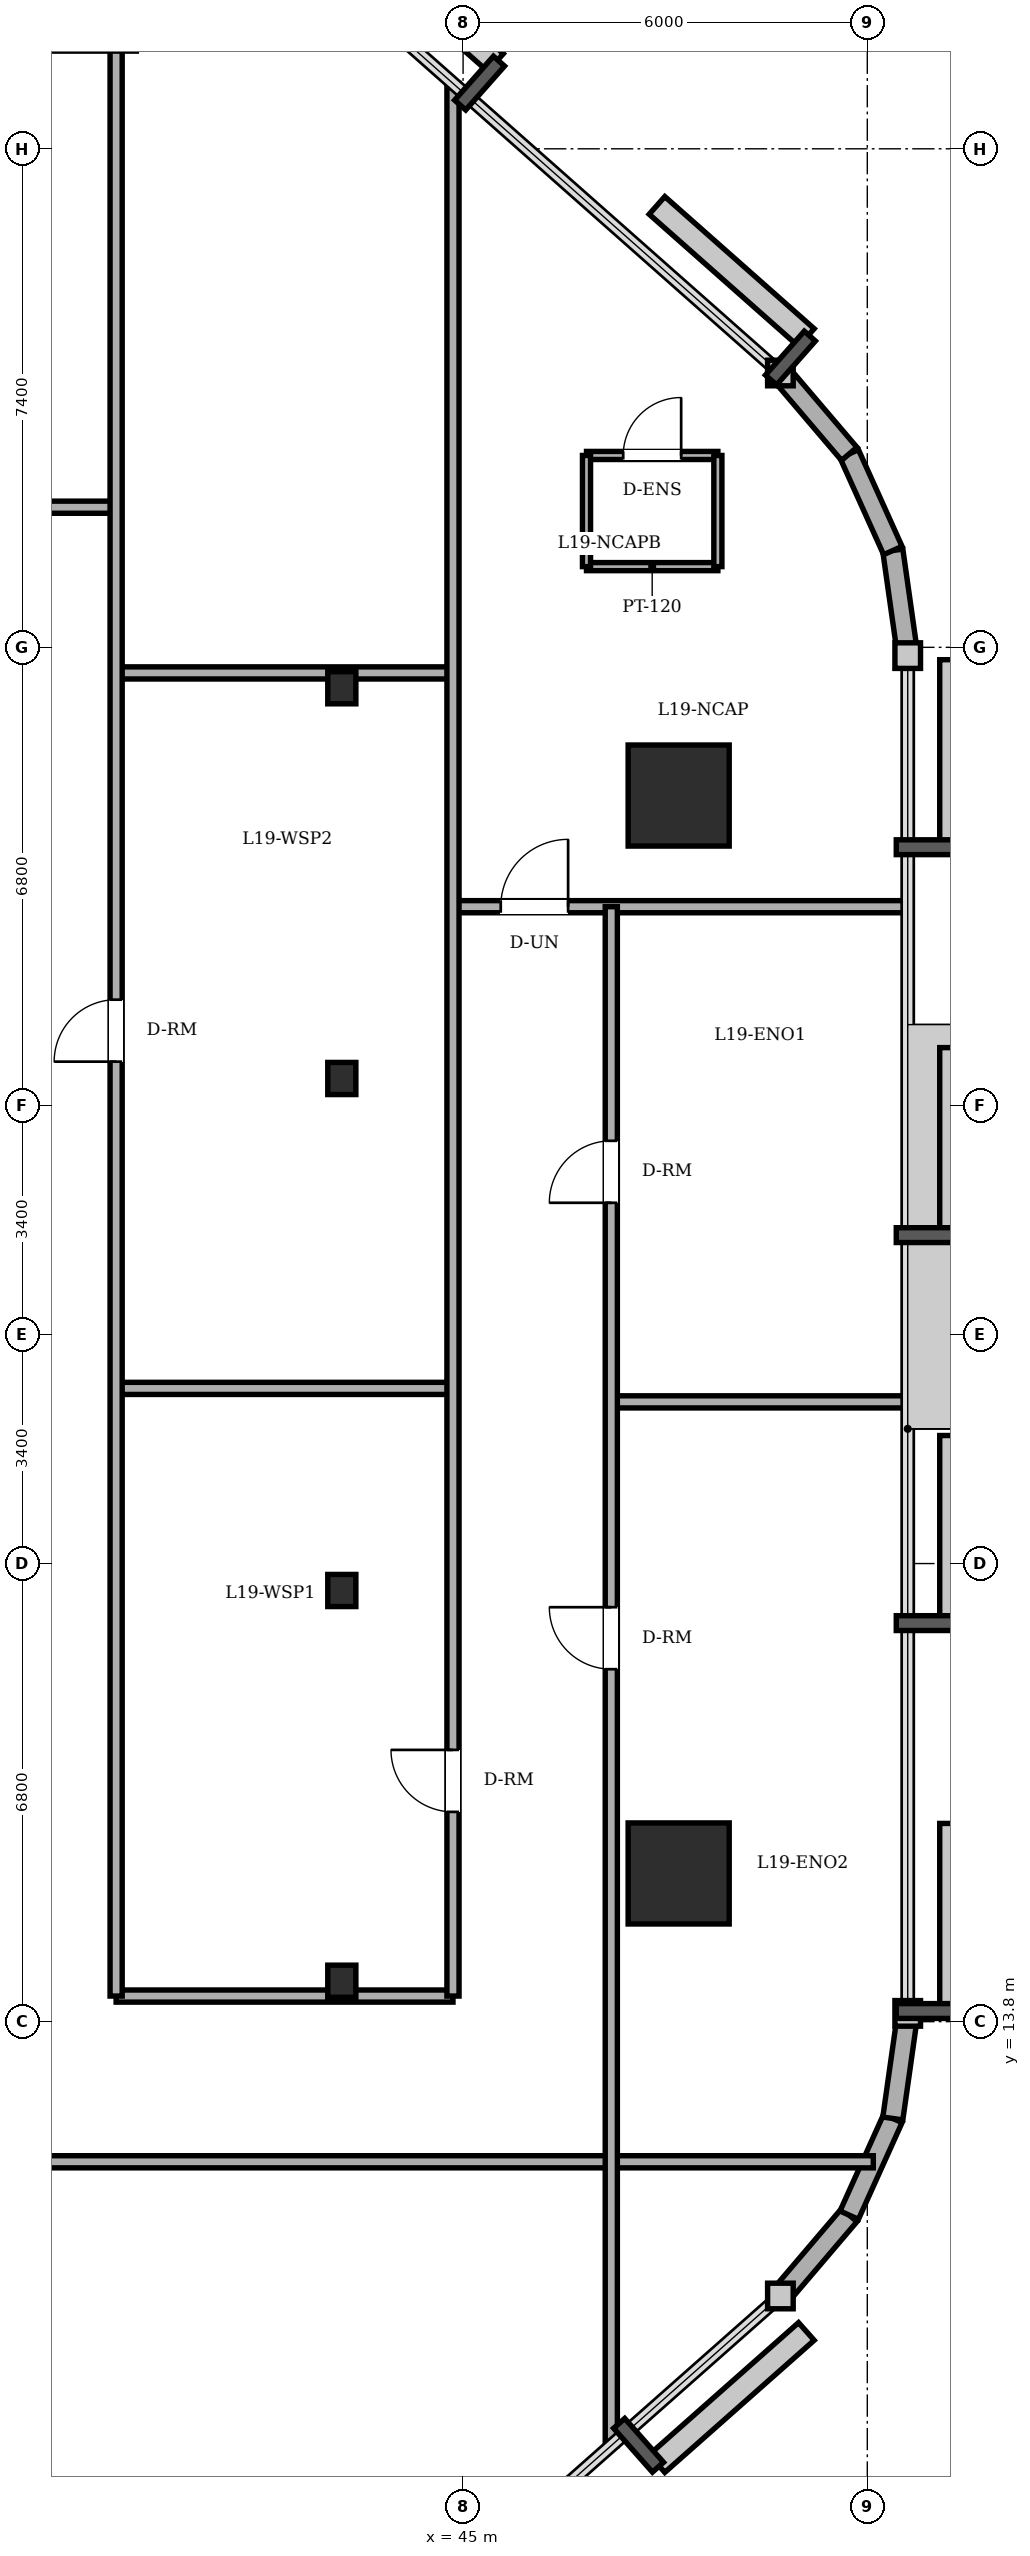
"""IFC4 building model, lengths in metres.
Left out: names, types, materials, properties, quantities, classifications, styles, units other than length and angle.
Written with IfcOpenShell. Run it as: python <this file> out.ifc"""

import sys

from ifc_helpers import new_model, si_unit, direction, frame, frame_2d, origin, origin_2d, place, context, subcontext, project, spatial, rectangle, circle, i_section, extrude, element, fill, save


model = new_model("IFC4")
c1 = context("Model", 3, precision=1e-05, world=origin(), true_north=direction((0.0, 1.0)))
c2 = subcontext(c1, "Body", "Model", "MODEL_VIEW")
j1 = project(units=[si_unit("LENGTHUNIT", "METRE"), si_unit("PLANEANGLEUNIT", "RADIAN")], contexts=[c1])
p1 = place(None, origin())
s1 = spatial("IfcSite", under=j1, at=p1, CompositionType="ELEMENT")
p2 = place(p1, origin())
s2 = spatial("IfcBuilding", under=s1, at=p2, CompositionType="ELEMENT")
p3 = place(p2, frame((0.0, 0.0, 72.0)))
s3 = spatial("IfcBuildingStorey", under=s2, at=p3, CompositionType="ELEMENT", Elevation=72.0)
for number, where, z_axis, x_axis in (
    (1, (48.2, 16.0, 0.0), (0.0, 0.0, 1.0), (1.0, 0.0, 0.0)),
    (2, (48.2, 32.0, 0.0), (0.0, 0.0, 1.0), (1.0, 0.0, 0.0)),
):
    element("IfcColumn", number, at=place(p3, frame(where, z_axis=z_axis, x_axis=x_axis)), inside=s3, PredefinedType="COLUMN", context=c2, shape_type="SweptSolid", body=[
        extrude(circle(Radius=0.75, at=origin_2d()), origin(), (0.0, 0.0, 1.0), 3.6),
    ])
for number, where, z_axis, x_axis in (
    (3, (43.2, 14.4, 0.0), (0.0, 0.0, 1.0), (1.0, 0.0, 0.0)),
    (4, (43.2, 20.2, 0.0), (0.0, 0.0, 1.0), (1.0, 0.0, 0.0)),
    (5, (43.2, 27.8, 0.0), (0.0, 0.0, 1.0), (1.0, 0.0, 0.0)),
    (6, (43.2, 33.6, 0.0), (0.0, 0.0, 1.0), (1.0, 0.0, 0.0)),
):
    element("IfcColumn", number, at=place(p3, frame(where, z_axis=z_axis, x_axis=x_axis)), inside=s3, PredefinedType="COLUMN", context=c2, shape_type="SweptSolid", body=[
        extrude(i_section(OverallWidth=0.417, OverallDepth=0.477, WebThickness=0.036, FlangeThickness=0.057, FilletRadius=0.015, at=origin_2d()), origin(), (0.0, 0.0, 1.0), 3.6),
    ])
p4 = place(p3, frame((49.71, 9.728, 0.0), z_axis=(0.0, 0.0, 1.0), x_axis=(0.648389989909, 0.7613083613, 0.0)))
e7 = element("IfcWall", 7, at=p4, inside=s3, PredefinedType="SOLIDWALL", context=c2, shape_type="SweptSolid", body=[
    extrude(rectangle(XDim=1.576, YDim=0.3, at=frame_2d((0.788, 0.0))), origin(), (0.0, 0.0, 1.0), 3.36),
])
p5 = place(p3, frame((50.732, 10.928, 0.0), z_axis=(0.0, 0.0, 1.0), x_axis=(0.410996558744, 0.911636895206, 0.0)))
e8 = element("IfcWall", 8, at=p5, inside=s3, PredefinedType="SOLIDWALL", context=c2, shape_type="SweptSolid", body=[
    extrude(rectangle(XDim=1.574, YDim=0.3, at=frame_2d((0.787, 0.0))), origin(), (0.0, 0.0, 1.0), 3.36),
])
for number, where, z_axis, x_axis in (
    (9, (51.379, 12.363, 0.0), (0.0, 0.0, 1.0), (0.14, 0.99, 0.0)),
    (10, (51.6, 34.077, 0.0), (0.0, 0.0, 1.0), (-0.14, 0.99, 0.0)),
):
    element("IfcWall", number, at=place(p3, frame(where, z_axis=z_axis, x_axis=x_axis)), inside=s3, PredefinedType="SOLIDWALL", context=c2, shape_type="SweptSolid", body=[
        extrude(rectangle(XDim=1.576, YDim=0.3, at=frame_2d((0.788, 0.0))), origin(), (0.0, 0.0, 1.0), 3.36),
    ])
p6 = place(p3, frame((51.379, 35.637, 0.0), z_axis=(0.0, 0.0, 1.0), x_axis=(-0.410996558744, 0.911636895206, 0.0)))
e11 = element("IfcWall", 11, at=p6, inside=s3, PredefinedType="SOLIDWALL", context=c2, shape_type="SweptSolid", body=[
    extrude(rectangle(XDim=1.574, YDim=0.3, at=frame_2d((0.787, 0.0))), origin(), (0.0, 0.0, 1.0), 3.36),
])
p7 = place(p3, frame((50.732, 37.072, 0.0), z_axis=(0.0, 0.0, 1.0), x_axis=(-0.648389989909, 0.7613083613, 0.0)))
e12 = element("IfcWall", 12, at=p7, inside=s3, PredefinedType="SOLIDWALL", context=c2, shape_type="SweptSolid", body=[
    extrude(rectangle(XDim=1.576, YDim=0.3, at=frame_2d((0.788, 0.0))), origin(), (0.0, 0.0, 1.0), 3.36),
])
p8 = place(p3, frame((46.832, 37.048, 0.0), z_axis=(0.0, 0.0, 1.0), x_axis=(1.0, 0.0, 0.0)))
e13 = element("IfcWall", 13, at=p8, inside=s3, PredefinedType="PARTITIONING", context=c2, shape_type="SweptSolid", body=[
    extrude(rectangle(XDim=1.95, YDim=0.12, at=frame_2d((0.975, 0.0))), origin(), (0.0, 0.0, 1.0), 3.36),
])
p9 = place(p8, frame((0.545, 0.0, 0.0)))
e14 = element("IfcOpeningElement", 14, at=p9, cuts=e13, PredefinedType="OPENING", context=c2, shape_type="SweptSolid", body=[
    extrude(rectangle(XDim=0.86, YDim=2.1, at=frame_2d((0.43, 1.05))), frame((0.0, 0.07, 0.0), z_axis=(0.0, -1.0, 0.0), x_axis=(1.0, 0.0, 0.0)), (0.0, 0.0, 1.0), 0.14),
])
p10 = place(p3, frame((48.782, 35.398, 0.0), z_axis=(0.0, 0.0, 1.0), x_axis=(-1.0, 0.0, 0.0)))
e15 = element("IfcWall", 15, at=p10, inside=s3, PredefinedType="PARTITIONING", context=c2, shape_type="SweptSolid", body=[
    extrude(rectangle(XDim=1.95, YDim=0.12, at=frame_2d((0.975, 0.0))), origin(), (0.0, 0.0, 1.0), 3.36),
])
for number, where, z_axis, x_axis in (
    (16, (46.832, 37.048, 0.0), (0.0, 0.0, 1.0), (0.0, -1.0, 0.0)),
    (17, (48.782, 35.398, 0.0), (0.0, 0.0, 1.0), (0.0, 1.0, 0.0)),
):
    element("IfcWall", number, at=place(p3, frame(where, z_axis=z_axis, x_axis=x_axis)), inside=s3, PredefinedType="PARTITIONING", context=c2, shape_type="SweptSolid", body=[
        extrude(rectangle(XDim=1.65, YDim=0.12, at=frame_2d((0.825, 0.0))), origin(), (0.0, 0.0, 1.0), 3.36),
    ])
p11 = place(p3, frame((3.4, 11.72, 0.0), z_axis=(0.0, 0.0, 1.0), x_axis=(1.0, 0.0, 0.0)))
e18 = element("IfcWall", 18, at=p11, inside=s3, PredefinedType="PARTITIONING", context=c2, shape_type="SweptSolid", body=[
    extrude(rectangle(XDim=47.689, YDim=0.18, at=frame_2d((23.845, 0.0))), origin(), (0.0, 0.0, 1.0), 3.36),
])
p12 = place(p11, frame((21.24, 0.0, 0.0)))
e19 = element("IfcOpeningElement", 19, at=p12, cuts=e18, PredefinedType="OPENING", context=c2, shape_type="SweptSolid", body=[
    extrude(rectangle(XDim=0.92, YDim=2.1, at=frame_2d((0.46, 1.05))), frame((0.0, 0.1, 0.0), z_axis=(0.0, -1.0, 0.0), x_axis=(1.0, 0.0, 0.0)), (0.0, 0.0, 1.0), 0.2),
])
p13 = place(p11, frame((10.74, 0.0, 0.0)))
e20 = element("IfcOpeningElement", 20, at=p13, cuts=e18, PredefinedType="OPENING", context=c2, shape_type="SweptSolid", body=[
    extrude(rectangle(XDim=0.92, YDim=2.1, at=frame_2d((0.46, 1.05))), frame((0.0, 0.1, 0.0), z_axis=(0.0, -1.0, 0.0), x_axis=(1.0, 0.0, 0.0)), (0.0, 0.0, 1.0), 0.2),
])
p14 = place(p11, frame((33.2, 0.0, 0.0)))
e21 = element("IfcOpeningElement", 21, at=p14, cuts=e18, PredefinedType="OPENING", context=c2, shape_type="SweptSolid", body=[
    extrude(rectangle(XDim=1.0, YDim=2.15, at=frame_2d((0.5, 1.075))), frame((0.0, 0.1, 0.0), z_axis=(0.0, -1.0, 0.0), x_axis=(1.0, 0.0, 0.0)), (0.0, 0.0, 1.0), 0.2),
])
p15 = place(p3, frame((39.85, 14.18, 0.0), z_axis=(0.0, 0.0, 1.0), x_axis=(1.0, 0.0, 0.0)))
e22 = element("IfcWall", 22, at=p15, inside=s3, PredefinedType="PARTITIONING", context=c2, shape_type="SweptSolid", body=[
    extrude(rectangle(XDim=5.0, YDim=0.18, at=frame_2d((2.5, 0.0))), origin(), (0.0, 0.0, 1.0), 2.742),
])
p16 = place(p3, frame((47.2, 23.0, 0.0), z_axis=(0.0, 0.0, 1.0), x_axis=(1.0, 0.0, 0.0)))
e23 = element("IfcWall", 23, at=p16, inside=s3, PredefinedType="PARTITIONING", context=c2, shape_type="SweptSolid", body=[
    extrude(rectangle(XDim=4.4, YDim=0.18, at=frame_2d((2.2, 0.0))), origin(), (0.0, 0.0, 1.0), 3.36),
])
p17 = place(p3, frame((39.85, 23.2, 0.0), z_axis=(0.0, 0.0, 1.0), x_axis=(1.0, 0.0, 0.0)))
e24 = element("IfcWall", 24, at=p17, inside=s3, PredefinedType="PARTITIONING", context=c2, shape_type="SweptSolid", body=[
    extrude(rectangle(XDim=5.0, YDim=0.18, at=frame_2d((2.5, 0.0))), origin(), (0.0, 0.0, 1.0), 3.36),
])
p18 = place(p3, frame((44.85, 30.35, 0.0), z_axis=(0.0, 0.0, 1.0), x_axis=(1.0, 0.0, 0.0)))
e25 = element("IfcWall", 25, at=p18, inside=s3, PredefinedType="PARTITIONING", context=c2, shape_type="SweptSolid", body=[
    extrude(rectangle(XDim=6.75, YDim=0.18, at=frame_2d((3.375, 0.0))), origin(), (0.0, 0.0, 1.0), 3.36),
])
p19 = place(p18, frame((0.709, 0.0, 0.0)))
e26 = element("IfcOpeningElement", 26, at=p19, cuts=e25, PredefinedType="OPENING", context=c2, shape_type="SweptSolid", body=[
    extrude(rectangle(XDim=1.0, YDim=2.15, at=frame_2d((0.5, 1.075))), frame((0.0, 0.1, 0.0), z_axis=(0.0, -1.0, 0.0), x_axis=(1.0, 0.0, 0.0)), (0.0, 0.0, 1.0), 0.2),
])
p20 = place(p3, frame((39.85, 33.82, 0.0), z_axis=(0.0, 0.0, 1.0), x_axis=(1.0, 0.0, 0.0)))
e27 = element("IfcWall", 27, at=p20, inside=s3, PredefinedType="PARTITIONING", context=c2, shape_type="SweptSolid", body=[
    extrude(rectangle(XDim=5.0, YDim=0.18, at=frame_2d((2.5, 0.0))), origin(), (0.0, 0.0, 1.0), 2.742),
])
p21 = place(p3, frame((3.4, 36.28, 0.0), z_axis=(0.0, 0.0, 1.0), x_axis=(1.0, 0.0, 0.0)))
e28 = element("IfcWall", 28, at=p21, inside=s3, PredefinedType="PARTITIONING", context=c2, shape_type="SweptSolid", body=[
    extrude(rectangle(XDim=36.45, YDim=0.18, at=frame_2d((18.225, 0.0))), origin(), (0.0, 0.0, 1.0), 3.36),
])
p22 = place(p21, frame((21.05, 0.0, 0.0)))
e29 = element("IfcOpeningElement", 29, at=p22, cuts=e28, PredefinedType="OPENING", context=c2, shape_type="SweptSolid", body=[
    extrude(rectangle(XDim=0.9, YDim=2.1, at=frame_2d((0.45, 1.05))), frame((0.0, 0.1, 0.0), z_axis=(0.0, -1.0, 0.0), x_axis=(1.0, 0.0, 0.0)), (0.0, 0.0, 1.0), 0.2),
])
p23 = place(p21, frame((24.67, 0.0, 0.0)))
e30 = element("IfcOpeningElement", 30, at=p23, cuts=e28, PredefinedType="OPENING", context=c2, shape_type="SweptSolid", body=[
    extrude(rectangle(XDim=0.86, YDim=2.1, at=frame_2d((0.43, 1.05))), frame((0.0, 0.1, 0.0), z_axis=(0.0, -1.0, 0.0), x_axis=(1.0, 0.0, 0.0)), (0.0, 0.0, 1.0), 0.2),
])
p24 = place(p21, frame((10.74, 0.0, 0.0)))
e31 = element("IfcOpeningElement", 31, at=p24, cuts=e28, PredefinedType="OPENING", context=c2, shape_type="SweptSolid", body=[
    extrude(rectangle(XDim=0.92, YDim=2.1, at=frame_2d((0.46, 1.05))), frame((0.0, 0.1, 0.0), z_axis=(0.0, -1.0, 0.0), x_axis=(1.0, 0.0, 0.0)), (0.0, 0.0, 1.0), 0.2),
])
p25 = place(p21, frame((31.005, 0.0, 0.0)))
e32 = element("IfcOpeningElement", 32, at=p25, cuts=e28, PredefinedType="OPENING", context=c2, shape_type="SweptSolid", body=[
    extrude(rectangle(XDim=0.92, YDim=2.1, at=frame_2d((0.46, 1.05))), frame((0.0, 0.1, 0.0), z_axis=(0.0, -1.0, 0.0), x_axis=(1.0, 0.0, 0.0)), (0.0, 0.0, 1.0), 0.2),
])
p26 = place(p3, frame((39.85, 14.18, 0.0), z_axis=(0.0, 0.0, 1.0), x_axis=(0.0, 1.0, 0.0)))
e33 = element("IfcWall", 33, at=p26, inside=s3, PredefinedType="PARTITIONING", context=c2, shape_type="SweptSolid", body=[
    extrude(rectangle(XDim=31.527, YDim=0.18, at=frame_2d((15.764, 0.0))), origin(), (0.0, 0.0, 1.0), 2.742),
])
p27 = place(p26, frame((13.87, 0.0, 0.0)))
e34 = element("IfcOpeningElement", 34, at=p27, cuts=e33, PredefinedType="OPENING", context=c2, shape_type="SweptSolid", body=[
    extrude(rectangle(XDim=0.92, YDim=2.1, at=frame_2d((0.46, 1.05))), frame((0.0, 0.1, 0.0), z_axis=(0.0, -1.0, 0.0), x_axis=(1.0, 0.0, 0.0)), (0.0, 0.0, 1.0), 0.2),
])
p28 = place(p3, frame((44.85, 14.18, 0.0), z_axis=(0.0, 0.0, 1.0), x_axis=(0.0, 1.0, 0.0)))
e35 = element("IfcWall", 35, at=p28, inside=s3, PredefinedType="PARTITIONING", context=c2, shape_type="SweptSolid", body=[
    extrude(rectangle(XDim=28.391, YDim=0.18, at=frame_2d((14.196, 0.0))), origin(), (0.0, 0.0, 1.0), 3.36),
])
p29 = place(p28, frame((2.734, 0.0, 0.0)))
e36 = element("IfcOpeningElement", 36, at=p29, cuts=e35, PredefinedType="OPENING", context=c2, shape_type="SweptSolid", body=[
    extrude(rectangle(XDim=0.92, YDim=2.1, at=frame_2d((0.46, 1.05))), frame((0.0, 0.1, 0.0), z_axis=(0.0, -1.0, 0.0), x_axis=(1.0, 0.0, 0.0)), (0.0, 0.0, 1.0), 0.2),
])
p30 = place(p3, frame((47.2, 7.508, 0.0), z_axis=(0.0, 0.0, 1.0), x_axis=(0.0, 1.0, 0.0)))
e37 = element("IfcWall", 37, at=p30, inside=s3, PredefinedType="PARTITIONING", context=c2, shape_type="SweptSolid", body=[
    extrude(rectangle(XDim=22.842, YDim=0.18, at=frame_2d((11.421, 0.0))), origin(), (0.0, 0.0, 1.0), 3.36),
])
p31 = place(p30, frame((18.447, 0.0, 0.0)))
e38 = element("IfcOpeningElement", 38, at=p31, cuts=e37, PredefinedType="OPENING", context=c2, shape_type="SweptSolid", body=[
    extrude(rectangle(XDim=0.92, YDim=2.1, at=frame_2d((0.46, 1.05))), frame((0.0, 0.1, 0.0), z_axis=(0.0, -1.0, 0.0), x_axis=(1.0, 0.0, 0.0)), (0.0, 0.0, 1.0), 0.2),
])
p32 = place(p30, frame((11.524, 0.0, 0.0)))
e39 = element("IfcOpeningElement", 39, at=p32, cuts=e37, PredefinedType="OPENING", context=c2, shape_type="SweptSolid", body=[
    extrude(rectangle(XDim=0.92, YDim=2.1, at=frame_2d((0.46, 1.05))), frame((0.0, 0.1, 0.0), z_axis=(0.0, -1.0, 0.0), x_axis=(1.0, 0.0, 0.0)), (0.0, 0.0, 1.0), 0.2),
])
p33 = place(p9, origin())
e40 = element("IfcDoor", 40, at=p33, inside=s3, OperationType="SINGLE_SWING_RIGHT", PredefinedType="DOOR", context=c2, shape_type="SweptSolid", body=[
    extrude(rectangle(XDim=0.86, YDim=2.1, at=frame_2d((0.43, 1.05))), frame((0.0, 0.025, 0.0), z_axis=(0.0, -1.0, 0.0), x_axis=(1.0, 0.0, 0.0)), (0.0, 0.0, 1.0), 0.05),
])
fill(e14, e40)
p34 = place(p29, origin())
e41 = element("IfcDoor", 41, at=p34, inside=s3, OperationType="SINGLE_SWING_RIGHT", PredefinedType="DOOR", context=c2, shape_type="SweptSolid", body=[
    extrude(rectangle(XDim=0.92, YDim=2.1, at=frame_2d((0.46, 1.05))), frame((0.0, 0.025, 0.0), z_axis=(0.0, -1.0, 0.0), x_axis=(1.0, 0.0, 0.0)), (0.0, 0.0, 1.0), 0.05),
])
fill(e36, e41)
p35 = place(p27, origin())
e42 = element("IfcDoor", 42, at=p35, inside=s3, OperationType="SINGLE_SWING_LEFT", PredefinedType="DOOR", context=c2, shape_type="SweptSolid", body=[
    extrude(rectangle(XDim=0.92, YDim=2.1, at=frame_2d((0.46, 1.05))), frame((0.0, 0.025, 0.0), z_axis=(0.0, -1.0, 0.0), x_axis=(1.0, 0.0, 0.0)), (0.0, 0.0, 1.0), 0.05),
])
fill(e34, e42)
p36 = place(p19, origin())
e43 = element("IfcDoor", 43, at=p36, inside=s3, OperationType="SINGLE_SWING_RIGHT", PredefinedType="DOOR", context=c2, shape_type="SweptSolid", body=[
    extrude(rectangle(XDim=1.0, YDim=2.15, at=frame_2d((0.5, 1.075))), frame((0.0, 0.025, 0.0), z_axis=(0.0, -1.0, 0.0), x_axis=(1.0, 0.0, 0.0)), (0.0, 0.0, 1.0), 0.05),
])
fill(e26, e43)
p37 = place(p31, origin())
e44 = element("IfcDoor", 44, at=p37, inside=s3, OperationType="SINGLE_SWING_LEFT", PredefinedType="DOOR", context=c2, shape_type="SweptSolid", body=[
    extrude(rectangle(XDim=0.92, YDim=2.1, at=frame_2d((0.46, 1.05))), frame((0.0, 0.025, 0.0), z_axis=(0.0, -1.0, 0.0), x_axis=(1.0, 0.0, 0.0)), (0.0, 0.0, 1.0), 0.05),
])
fill(e38, e44)
p38 = place(p32, origin())
e45 = element("IfcDoor", 45, at=p38, inside=s3, OperationType="SINGLE_SWING_RIGHT", PredefinedType="DOOR", context=c2, shape_type="SweptSolid", body=[
    extrude(rectangle(XDim=0.92, YDim=2.1, at=frame_2d((0.46, 1.05))), frame((0.0, 0.025, 0.0), z_axis=(0.0, -1.0, 0.0), x_axis=(1.0, 0.0, 0.0)), (0.0, 0.0, 1.0), 0.05),
])
fill(e39, e45)
save(model, sys.argv[1])
